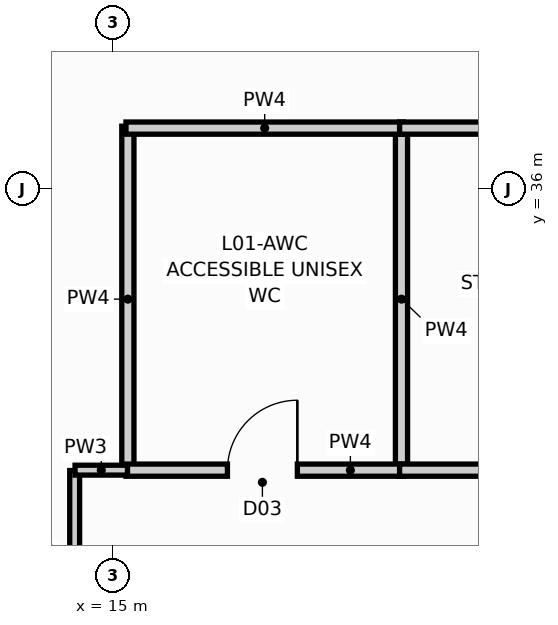
"""IFC4 building model, lengths in metres.
Left out: names, types, materials, properties, quantities, classifications, styles, units other than length and angle.
Written with IfcOpenShell. Run it as: python <this file> out.ifc"""

import sys

from ifc_helpers import new_model, si_unit, direction, frame, frame_2d, origin, place, context, subcontext, project, spatial, rectangle, extrude, element, fill, save


model = new_model("IFC4")
c1 = context("Model", 3, precision=1e-05, world=origin(), true_north=direction((0.0, 1.0)))
c2 = subcontext(c1, "Body", "Model", "MODEL_VIEW")
j1 = project(units=[si_unit("LENGTHUNIT", "METRE"), si_unit("PLANEANGLEUNIT", "RADIAN")], contexts=[c1])
p1 = place(None, origin())
s1 = spatial("IfcSite", under=j1, at=p1, CompositionType="ELEMENT")
p2 = place(p1, origin())
s2 = spatial("IfcBuilding", under=s1, at=p2, CompositionType="ELEMENT")
p3 = place(p2, frame((0.0, 0.0, 5.4)))
s3 = spatial("IfcBuildingStorey", under=s2, at=p3, CompositionType="ELEMENT", Elevation=5.4)
for number, where, z_axis, x_axis in (
    (1, (15.2, 32.275, 0.0), (0.0, 0.0, 1.0), (0.0, 1.0, 0.0)),
    (2, (18.8, 32.275, 0.0), (0.0, 0.0, 1.0), (0.0, 1.0, 0.0)),
):
    element("IfcWall", number, at=place(p3, frame(where, z_axis=z_axis, x_axis=x_axis)), inside=s3, PredefinedType="PLUMBINGWALL", context=c2, shape_type="SweptSolid", body=[
        extrude(rectangle(XDim=4.55, YDim=0.16, at=frame_2d((2.275, 0.0))), origin(), (0.0, 0.0, 1.0), 4.48),
    ])
p4 = place(p3, frame((15.175, 32.3, 0.0), z_axis=(0.0, 0.0, 1.0), x_axis=(1.0, 0.0, 0.0)))
e3 = element("IfcWall", 3, at=p4, inside=s3, PredefinedType="PLUMBINGWALL", context=c2, shape_type="SweptSolid", body=[
    extrude(rectangle(XDim=3.65, YDim=0.16, at=frame_2d((1.825, 0.0))), origin(), (0.0, 0.0, 1.0), 4.48),
])
p5 = place(p4, frame((1.335, 0.0, 0.0)))
e4 = element("IfcOpeningElement", 4, at=p5, cuts=e3, PredefinedType="OPENING", context=c2, shape_type="SweptSolid", body=[
    extrude(rectangle(XDim=0.92, YDim=2.1, at=frame_2d((0.46, 1.05))), frame((0.0, 0.092, 0.0), z_axis=(0.0, -1.0, 0.0), x_axis=(1.0, 0.0, 0.0)), (0.0, 0.0, 1.0), 0.184),
])
p6 = place(p3, frame((15.175, 36.8, 0.0), z_axis=(0.0, 0.0, 1.0), x_axis=(1.0, 0.0, 0.0)))
e5 = element("IfcWall", 5, at=p6, inside=s3, PredefinedType="PLUMBINGWALL", context=c2, shape_type="SweptSolid", body=[
    extrude(rectangle(XDim=3.65, YDim=0.16, at=frame_2d((1.825, 0.0))), origin(), (0.0, 0.0, 1.0), 4.48),
])
p7 = place(p3, frame((18.775, 32.3, 0.0), z_axis=(0.0, 0.0, 1.0), x_axis=(1.0, 0.0, 0.0)))
e6 = element("IfcWall", 6, at=p7, inside=s3, PredefinedType="PLUMBINGWALL", context=c2, shape_type="SweptSolid", body=[
    extrude(rectangle(XDim=3.65, YDim=0.16, at=frame_2d((1.825, 0.0))), origin(), (0.0, 0.0, 1.0), 4.48),
])
p8 = place(p7, frame((1.335, 0.0, 0.0)))
e7 = element("IfcOpeningElement", 7, at=p8, cuts=e6, PredefinedType="OPENING", context=c2, shape_type="SweptSolid", body=[
    extrude(rectangle(XDim=0.92, YDim=2.1, at=frame_2d((0.46, 1.05))), frame((0.0, 0.092, 0.0), z_axis=(0.0, -1.0, 0.0), x_axis=(1.0, 0.0, 0.0)), (0.0, 0.0, 1.0), 0.184),
])
p9 = place(p3, frame((18.775, 36.8, 0.0), z_axis=(0.0, 0.0, 1.0), x_axis=(1.0, 0.0, 0.0)))
e8 = element("IfcWall", 8, at=p9, inside=s3, PredefinedType="PLUMBINGWALL", context=c2, shape_type="SweptSolid", body=[
    extrude(rectangle(XDim=3.65, YDim=0.16, at=frame_2d((1.825, 0.0))), origin(), (0.0, 0.0, 1.0), 4.48),
])
p10 = place(p3, frame((14.5, 30.105, 0.0), z_axis=(0.0, 0.0, 1.0), x_axis=(0.0, 1.0, 0.0)))
e9 = element("IfcWall", 9, at=p10, inside=s3, PredefinedType="PARTITIONING", context=c2, shape_type="SweptSolid", body=[
    extrude(rectangle(XDim=2.19, YDim=0.13, at=frame_2d((1.095, 0.0))), origin(), (0.0, 0.0, 1.0), 4.48),
])
p11 = place(p3, frame((14.505, 32.3, 0.0), z_axis=(0.0, 0.0, 1.0), x_axis=(1.0, 0.0, 0.0)))
e10 = element("IfcWall", 10, at=p11, inside=s3, PredefinedType="PARTITIONING", context=c2, shape_type="SweptSolid", body=[
    extrude(rectangle(XDim=0.69, YDim=0.13, at=frame_2d((0.345, 0.0))), origin(), (0.0, 0.0, 1.0), 4.48),
])
p12 = place(p5, origin())
e11 = element("IfcDoor", 11, at=p12, inside=s3, OperationType="SINGLE_SWING_RIGHT", PredefinedType="DOOR", context=c2, shape_type="SweptSolid", body=[
    extrude(rectangle(XDim=0.92, YDim=2.1, at=frame_2d((0.46, 1.05))), frame((0.0, 0.025, 0.0), z_axis=(0.0, -1.0, 0.0), x_axis=(1.0, 0.0, 0.0)), (0.0, 0.0, 1.0), 0.05),
])
fill(e4, e11)
save(model, sys.argv[1])
